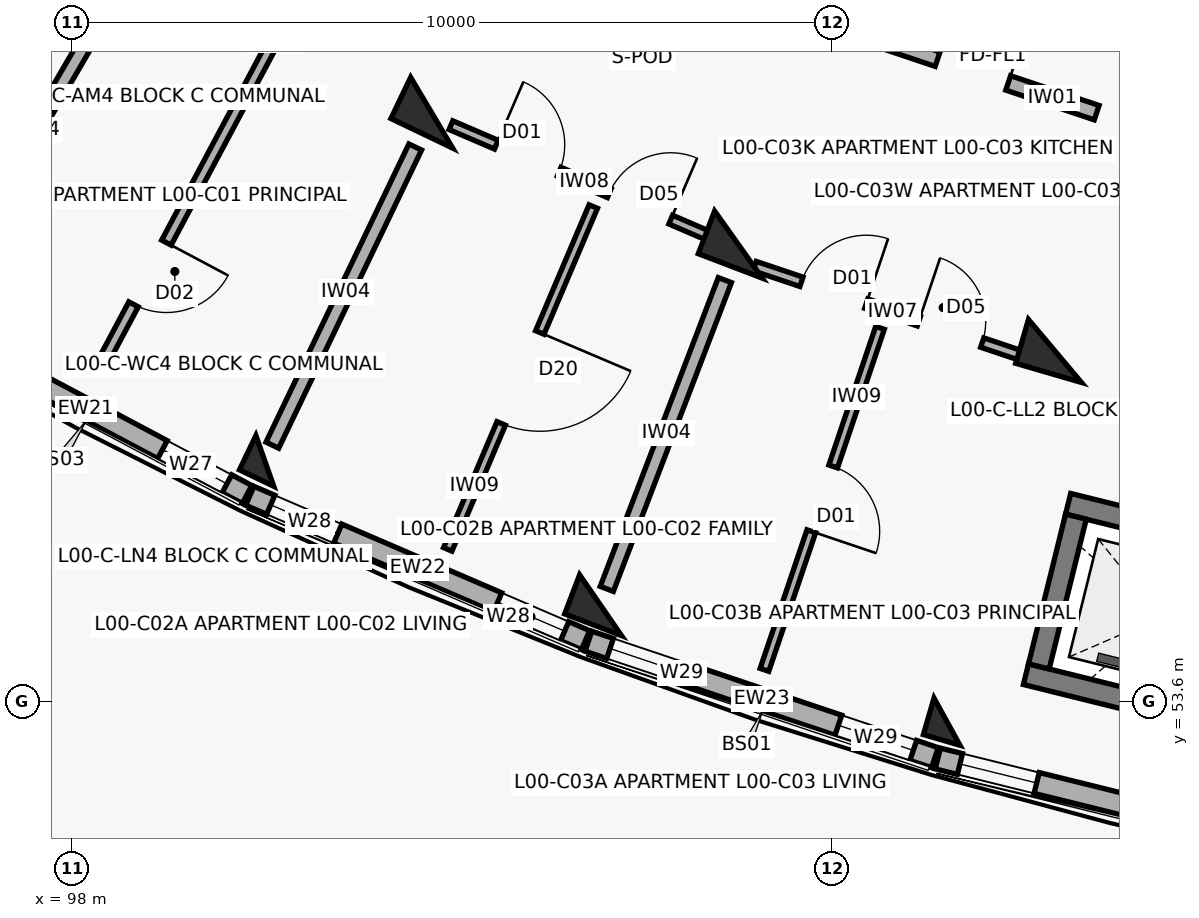
"""IFC4 building model, lengths in metres.
Left out: names, types, materials, properties, quantities, classifications, styles, units other than length and angle.
Written with IfcOpenShell. Run it as: python <this file> out.ifc"""

import sys

from ifc_helpers import new_model, si_unit, direction, frame, frame_2d, origin, origin_2d, place, context, subcontext, project, spatial, rectangle, extrude, element, fill, save


model = new_model("IFC4")
c1 = context("Model", 3, precision=1e-05, world=origin(), true_north=direction((0.0, 1.0)))
c2 = subcontext(c1, "Body", "Model", "MODEL_VIEW")
j1 = project(units=[si_unit("LENGTHUNIT", "METRE"), si_unit("PLANEANGLEUNIT", "RADIAN")], contexts=[c1])
p1 = place(None, origin())
s1 = spatial("IfcSite", under=j1, at=p1, CompositionType="ELEMENT")
p2 = place(p1, origin())
s2 = spatial("IfcBuilding", under=s1, at=p2, CompositionType="ELEMENT")
p3 = place(p2, origin())
s3 = spatial("IfcBuildingStorey", under=s2, at=p3, CompositionType="ELEMENT", Elevation=0.0)
p4 = place(p3, frame((102.734, 61.341, 0.0), z_axis=(0.0, 0.0, 1.0), x_axis=(-0.432085748802, -0.901832526405, 0.0)))
e1 = element("IfcColumn", 1, at=p4, inside=s3, PredefinedType="COLUMN", context=c2, shape_type="SweptSolid", body=[
    extrude(rectangle(XDim=0.6, YDim=0.9, at=origin_2d()), origin(), (0.0, 0.0, 1.0), 4.5),
])
p5 = place(p3, frame((100.539, 56.76, 0.0), z_axis=(0.0, 0.0, 1.0), x_axis=(-0.432085748802, -0.901832526405, 0.0)))
e2 = element("IfcColumn", 2, at=p5, inside=s3, PredefinedType="COLUMN", context=c2, shape_type="SweptSolid", body=[
    extrude(rectangle(XDim=0.5, YDim=0.5, at=origin_2d()), origin(), (0.0, 0.0, 1.0), 4.5),
])
p6 = place(p3, frame((106.77, 59.606, 0.0), z_axis=(0.0, 0.0, 1.0), x_axis=(-0.357064076459, -0.934079892355, 0.0)))
e3 = element("IfcColumn", 3, at=p6, inside=s3, PredefinedType="COLUMN", context=c2, shape_type="SweptSolid", body=[
    extrude(rectangle(XDim=0.6, YDim=0.9, at=origin_2d()), origin(), (0.0, 0.0, 1.0), 4.5),
])
p7 = place(p3, frame((104.956, 54.861, 0.0), z_axis=(0.0, 0.0, 1.0), x_axis=(-0.357064076459, -0.934079892355, 0.0)))
e4 = element("IfcColumn", 4, at=p7, inside=s3, PredefinedType="COLUMN", context=c2, shape_type="SweptSolid", body=[
    extrude(rectangle(XDim=0.55, YDim=0.8, at=origin_2d()), origin(), (0.0, 0.0, 1.0), 4.5),
])
p8 = place(p3, frame((110.934, 58.207, 0.0), z_axis=(0.0, 0.0, 1.0), x_axis=(-0.27966144946, -0.96009867914, 0.0)))
e5 = element("IfcColumn", 5, at=p8, inside=s3, PredefinedType="COLUMN", context=c2, shape_type="SweptSolid", body=[
    extrude(rectangle(XDim=0.6, YDim=0.9, at=origin_2d()), origin(), (0.0, 0.0, 1.0), 4.5),
])
p9 = place(p3, frame((109.513, 53.329, 0.0), z_axis=(0.0, 0.0, 1.0), x_axis=(-0.27966144946, -0.96009867914, 0.0)))
e6 = element("IfcColumn", 6, at=p9, inside=s3, PredefinedType="COLUMN", context=c2, shape_type="SweptSolid", body=[
    extrude(rectangle(XDim=0.5, YDim=0.5, at=origin_2d()), origin(), (0.0, 0.0, 1.0), 4.5),
])
p10 = place(p3, frame((96.057, 58.572, 0.0), z_axis=(0.0, 0.0, 1.0), x_axis=(0.883448093208, -0.468529045639, 0.0)))
e7 = element("IfcWall", 7, at=p10, inside=s3, PredefinedType="SOLIDWALL", context=c2, shape_type="SweptSolid", body=[
    extrude(rectangle(XDim=4.809, YDim=0.268, at=frame_2d((2.405, 0.0))), origin(), (0.0, 0.0, 1.0), 3.45),
])
p11 = place(p10, frame((0.3, 0.0, 0.3)))
e8 = element("IfcOpeningElement", 8, at=p11, cuts=e7, PredefinedType="OPENING", context=c2, shape_type="SweptSolid", body=[
    extrude(rectangle(XDim=0.96, YDim=1.42, at=frame_2d((0.48, 0.71))), frame((0.0, 0.144, 0.0), z_axis=(0.0, -1.0, 0.0), x_axis=(1.0, 0.0, 0.0)), (0.0, 0.0, 1.0), 0.288),
])
p12 = place(p10, frame((3.549, 0.0, 0.3)))
e9 = element("IfcOpeningElement", 9, at=p12, cuts=e7, PredefinedType="OPENING", context=c2, shape_type="SweptSolid", body=[
    extrude(rectangle(XDim=0.96, YDim=1.42, at=frame_2d((0.48, 0.71))), frame((0.0, 0.144, 0.0), z_axis=(0.0, -1.0, 0.0), x_axis=(1.0, 0.0, 0.0)), (0.0, 0.0, 1.0), 0.288),
])
p13 = place(p3, frame((100.341, 56.301, 0.0), z_axis=(0.0, 0.0, 1.0), x_axis=(0.918737524932, -0.39486878869, 0.0)))
e10 = element("IfcWall", 10, at=p13, inside=s3, PredefinedType="SOLIDWALL", context=c2, shape_type="SweptSolid", body=[
    extrude(rectangle(XDim=4.809, YDim=0.272, at=frame_2d((2.405, 0.0))), origin(), (0.0, 0.0, 1.0), 3.45),
])
p14 = place(p13, frame((0.3, 0.0, 0.3)))
e11 = element("IfcOpeningElement", 11, at=p14, cuts=e10, PredefinedType="OPENING", context=c2, shape_type="SweptSolid", body=[
    extrude(rectangle(XDim=0.96, YDim=1.56, at=frame_2d((0.48, 0.78))), frame((0.0, 0.146, 0.0), z_axis=(0.0, -1.0, 0.0), x_axis=(1.0, 0.0, 0.0)), (0.0, 0.0, 1.0), 0.292),
])
p15 = place(p13, frame((3.549, 0.0, 0.3)))
e12 = element("IfcOpeningElement", 12, at=p15, cuts=e10, PredefinedType="OPENING", context=c2, shape_type="SweptSolid", body=[
    extrude(rectangle(XDim=0.96, YDim=1.56, at=frame_2d((0.48, 0.78))), frame((0.0, 0.146, 0.0), z_axis=(0.0, -1.0, 0.0), x_axis=(1.0, 0.0, 0.0)), (0.0, 0.0, 1.0), 0.292),
])
p16 = place(p3, frame((104.796, 54.388, 0.0), z_axis=(0.0, 0.0, 1.0), x_axis=(0.947883232114, -0.318617918952, 0.0)))
e13 = element("IfcWall", 13, at=p16, inside=s3, PredefinedType="SOLIDWALL", context=c2, shape_type="SweptSolid", body=[
    extrude(rectangle(XDim=4.809, YDim=0.278, at=frame_2d((2.405, 0.0))), origin(), (0.0, 0.0, 1.0), 3.45),
])
p17 = place(p16, frame((0.3, 0.0, 0.3)))
e14 = element("IfcOpeningElement", 14, at=p17, cuts=e13, PredefinedType="OPENING", context=c2, shape_type="SweptSolid", body=[
    extrude(rectangle(XDim=1.04, YDim=1.16, at=frame_2d((0.52, 0.58))), frame((0.0, 0.149, 0.0), z_axis=(0.0, -1.0, 0.0), x_axis=(1.0, 0.0, 0.0)), (0.0, 0.0, 1.0), 0.298),
])
p18 = place(p16, frame((3.469, 0.0, 0.3)))
e15 = element("IfcOpeningElement", 15, at=p18, cuts=e13, PredefinedType="OPENING", context=c2, shape_type="SweptSolid", body=[
    extrude(rectangle(XDim=1.04, YDim=1.16, at=frame_2d((0.52, 0.58))), frame((0.0, 0.149, 0.0), z_axis=(0.0, -1.0, 0.0), x_axis=(1.0, 0.0, 0.0)), (0.0, 0.0, 1.0), 0.298),
])
p19 = place(p3, frame((109.393, 52.844, 0.0), z_axis=(0.0, 0.0, 1.0), x_axis=(0.970716115822, -0.240229520426, 0.0)))
e16 = element("IfcWall", 16, at=p19, inside=s3, PredefinedType="SOLIDWALL", context=c2, shape_type="SweptSolid", body=[
    extrude(rectangle(XDim=4.809, YDim=0.282, at=frame_2d((2.405, 0.0))), origin(), (0.0, 0.0, 1.0), 3.45),
])
p20 = place(p19, frame((0.3, 0.0, 0.3)))
e17 = element("IfcOpeningElement", 17, at=p20, cuts=e16, PredefinedType="OPENING", context=c2, shape_type="SweptSolid", body=[
    extrude(rectangle(XDim=1.04, YDim=1.28, at=frame_2d((0.52, 0.64))), frame((0.0, 0.151, 0.0), z_axis=(0.0, -1.0, 0.0), x_axis=(1.0, 0.0, 0.0)), (0.0, 0.0, 1.0), 0.302),
])
p21 = place(p19, frame((3.469, 0.0, 0.3)))
e18 = element("IfcOpeningElement", 18, at=p21, cuts=e16, PredefinedType="OPENING", context=c2, shape_type="SweptSolid", body=[
    extrude(rectangle(XDim=1.04, YDim=1.28, at=frame_2d((0.52, 0.64))), frame((0.0, 0.151, 0.0), z_axis=(0.0, -1.0, 0.0), x_axis=(1.0, 0.0, 0.0)), (0.0, 0.0, 1.0), 0.302),
])
p22 = place(p3, frame((111.108, 56.196, 0.0), z_axis=(0.0, 0.0, 1.0), x_axis=(0.970706856107, -0.240266933861, 0.0)))
e19 = element("IfcWall", 19, at=p22, inside=s3, PredefinedType="SHEAR", context=c2, shape_type="SweptSolid", body=[
    extrude(rectangle(XDim=3.09, YDim=0.28, at=frame_2d((1.545, 0.0))), origin(), (0.0, 0.0, 1.0), 4.5),
])
p23 = place(p22, frame((0.995, 0.0, 0.0)))
e20 = element("IfcOpeningElement", 20, at=p23, cuts=e19, PredefinedType="OPENING", context=c2, shape_type="SweptSolid", body=[
    extrude(rectangle(XDim=1.1, YDim=2.15, at=frame_2d((0.55, 1.075))), frame((0.0, 0.15, 0.0), z_axis=(0.0, -1.0, 0.0), x_axis=(1.0, 0.0, 0.0)), (0.0, 0.0, 1.0), 0.3),
])
p24 = place(p3, frame((110.553, 53.954, 0.0), z_axis=(0.0, 0.0, 1.0), x_axis=(0.970725280816, -0.240192483614, 0.0)))
e21 = element("IfcWall", 21, at=p24, inside=s3, PredefinedType="SHEAR", context=c2, shape_type="SweptSolid", body=[
    extrude(rectangle(XDim=3.09, YDim=0.28, at=frame_2d((1.545, 0.0))), origin(), (0.0, 0.0, 1.0), 4.5),
])
p25 = place(p3, frame((111.21, 56.027, 0.0), z_axis=(0.0, 0.0, 1.0), x_axis=(-0.240186044774, -0.970726873995, 0.0)))
e22 = element("IfcWall", 22, at=p25, inside=s3, PredefinedType="SHEAR", context=c2, shape_type="SweptSolid", body=[
    extrude(rectangle(XDim=2.03, YDim=0.28, at=frame_2d((1.015, 0.0))), origin(), (0.0, 0.0, 1.0), 4.5),
])
p26 = place(p3, frame((102.087, 64.973, 0.0), z_axis=(0.0, 0.0, 1.0), x_axis=(-0.469878800394, -0.882730940287, 0.0)))
e23 = element("IfcWall", 23, at=p26, inside=s3, PredefinedType="PARTITIONING", context=c2, shape_type="SweptSolid", body=[
    extrude(rectangle(XDim=7.95, YDim=0.14, at=frame_2d((3.975, 0.0))), origin(), (0.0, 0.0, 1.0), 3.34),
])
p27 = place(p26, frame((6.05, 0.0, 0.0)))
e24 = element("IfcOpeningElement", 24, at=p27, cuts=e23, PredefinedType="OPENING", context=c2, shape_type="SweptSolid", body=[
    extrude(rectangle(XDim=0.92, YDim=2.1, at=frame_2d((0.46, 1.05))), frame((0.0, 0.08, 0.0), z_axis=(0.0, -1.0, 0.0), x_axis=(1.0, 0.0, 0.0)), (0.0, 0.0, 1.0), 0.16),
])
p28 = place(p3, frame((98.601, 62.968, 0.0), z_axis=(0.0, 0.0, 1.0), x_axis=(-0.504216452091, -0.863577309475, 0.0)))
e25 = element("IfcWall", 25, at=p28, inside=s3, PredefinedType="SOLIDWALL", context=c2, shape_type="SweptSolid", body=[
    extrude(rectangle(XDim=4.35, YDim=0.185, at=frame_2d((2.175, 0.0))), origin(), (0.0, 0.0, 1.0), 3.34),
])
p29 = place(p3, frame((102.988, 61.178, 0.0), z_axis=(0.0, 0.0, 1.0), x_axis=(0.918732171064, -0.394881245253, 0.0)))
e26 = element("IfcWall", 26, at=p29, inside=s3, PredefinedType="PARTITIONING", context=c2, shape_type="SweptSolid", body=[
    extrude(rectangle(XDim=3.797, YDim=0.125, at=frame_2d((1.899, 0.0))), origin(), (0.0, 0.0, 1.0), 3.34),
])
p30 = place(p29, frame((0.65, 0.0, 0.0)))
e27 = element("IfcOpeningElement", 27, at=p30, cuts=e26, PredefinedType="OPENING", context=c2, shape_type="SweptSolid", body=[
    extrude(rectangle(XDim=0.9, YDim=2.1, at=frame_2d((0.45, 1.05))), frame((0.0, 0.073, 0.0), z_axis=(0.0, -1.0, 0.0), x_axis=(1.0, 0.0, 0.0)), (0.0, 0.0, 1.0), 0.145),
])
p31 = place(p29, frame((2.267, 0.0, 0.0)))
e28 = element("IfcOpeningElement", 28, at=p31, cuts=e26, PredefinedType="OPENING", context=c2, shape_type="SweptSolid", body=[
    extrude(rectangle(XDim=0.88, YDim=2.1, at=frame_2d((0.44, 1.05))), frame((0.0, 0.073, 0.0), z_axis=(0.0, -1.0, 0.0), x_axis=(1.0, 0.0, 0.0)), (0.0, 0.0, 1.0), 0.145),
])
p32 = place(p3, frame((104.86, 60.107, 0.0), z_axis=(0.0, 0.0, 1.0), x_axis=(-0.390783996242, -0.920482410631, 0.0)))
e29 = element("IfcWall", 29, at=p32, inside=s3, PredefinedType="PARTITIONING", context=c2, shape_type="SweptSolid", body=[
    extrude(rectangle(XDim=4.9, YDim=0.12, at=frame_2d((2.45, 0.0))), origin(), (0.0, 0.0, 1.0), 3.34),
])
p33 = place(p32, frame((1.8, 0.0, 0.0)))
e30 = element("IfcOpeningElement", 30, at=p33, cuts=e29, PredefinedType="OPENING", context=c2, shape_type="SweptSolid", body=[
    extrude(rectangle(XDim=1.3, YDim=2.1, at=frame_2d((0.65, 1.05))), frame((0.0, 0.07, 0.0), z_axis=(0.0, -1.0, 0.0), x_axis=(1.0, 0.0, 0.0)), (0.0, 0.0, 1.0), 0.14),
])
p34 = place(p3, frame((102.518, 60.89, 0.0), z_axis=(0.0, 0.0, 1.0), x_axis=(-0.432108769108, -0.901821496561, 0.0)))
e31 = element("IfcWall", 31, at=p34, inside=s3, PredefinedType="SOLIDWALL", context=c2, shape_type="SweptSolid", body=[
    extrude(rectangle(XDim=4.35, YDim=0.185, at=frame_2d((2.175, 0.0))), origin(), (0.0, 0.0, 1.0), 3.34),
])
p35 = place(p3, frame((108.227, 62.437, 0.0), z_axis=(0.0, 0.0, 1.0), x_axis=(0.947884468821, -0.318614239745, 0.0)))
e32 = element("IfcWall", 32, at=p35, inside=s3, PredefinedType="SOLIDWALL", context=c2, shape_type="SweptSolid", body=[
    extrude(rectangle(XDim=3.436, YDim=0.2, at=frame_2d((1.718, 0.0))), origin(), (0.0, 0.0, 1.0), 3.34),
])
p36 = place(p35, frame((1.228, 0.0, 0.0)))
e33 = element("IfcOpeningElement", 33, at=p36, cuts=e32, PredefinedType="OPENING", context=c2, shape_type="SweptSolid", body=[
    extrude(rectangle(XDim=0.98, YDim=2.15, at=frame_2d((0.49, 1.075))), frame((0.0, 0.11, 0.0), z_axis=(0.0, -1.0, 0.0), x_axis=(1.0, 0.0, 0.0)), (0.0, 0.0, 1.0), 0.22),
])
p37 = place(p3, frame((106.983, 59.324, 0.0), z_axis=(0.0, 0.0, 1.0), x_axis=(0.947879193428, -0.318629933725, 0.0)))
e34 = element("IfcWall", 34, at=p37, inside=s3, PredefinedType="PARTITIONING", context=c2, shape_type="SweptSolid", body=[
    extrude(rectangle(XDim=3.81, YDim=0.13, at=frame_2d((1.905, 0.0))), origin(), (0.0, 0.0, 1.0), 3.34),
])
p38 = place(p37, frame((0.65, 0.0, 0.0)))
e35 = element("IfcOpeningElement", 35, at=p38, cuts=e34, PredefinedType="OPENING", context=c2, shape_type="SweptSolid", body=[
    extrude(rectangle(XDim=0.9, YDim=2.1, at=frame_2d((0.45, 1.05))), frame((0.0, 0.075, 0.0), z_axis=(0.0, -1.0, 0.0), x_axis=(1.0, 0.0, 0.0)), (0.0, 0.0, 1.0), 0.15),
])
p39 = place(p37, frame((2.28, 0.0, 0.0)))
e36 = element("IfcOpeningElement", 36, at=p39, cuts=e34, PredefinedType="OPENING", context=c2, shape_type="SweptSolid", body=[
    extrude(rectangle(XDim=0.88, YDim=2.1, at=frame_2d((0.44, 1.05))), frame((0.0, 0.075, 0.0), z_axis=(0.0, -1.0, 0.0), x_axis=(1.0, 0.0, 0.0)), (0.0, 0.0, 1.0), 0.15),
])
p40 = place(p3, frame((108.633, 58.511, 0.0), z_axis=(0.0, 0.0, 1.0), x_axis=(-0.320064719126, -0.947395680574, 0.0)))
e37 = element("IfcWall", 37, at=p40, inside=s3, PredefinedType="PARTITIONING", context=c2, shape_type="SweptSolid", body=[
    extrude(rectangle(XDim=4.75, YDim=0.12, at=frame_2d((2.375, 0.0))), origin(), (0.0, 0.0, 1.0), 3.34),
])
p41 = place(p40, frame((1.925, 0.0, 0.0)))
e38 = element("IfcOpeningElement", 38, at=p41, cuts=e37, PredefinedType="OPENING", context=c2, shape_type="SweptSolid", body=[
    extrude(rectangle(XDim=0.9, YDim=2.1, at=frame_2d((0.45, 1.05))), frame((0.0, 0.07, 0.0), z_axis=(0.0, -1.0, 0.0), x_axis=(1.0, 0.0, 0.0)), (0.0, 0.0, 1.0), 0.14),
])
p42 = place(p3, frame((106.591, 59.139, 0.0), z_axis=(0.0, 0.0, 1.0), x_axis=(-0.357064016205, -0.934079915388, 0.0)))
e39 = element("IfcWall", 39, at=p42, inside=s3, PredefinedType="SOLIDWALL", context=c2, shape_type="SweptSolid", body=[
    extrude(rectangle(XDim=4.35, YDim=0.185, at=frame_2d((2.175, 0.0))), origin(), (0.0, 0.0, 1.0), 3.34),
])
p43 = place(p12, origin())
e40 = element("IfcWindow", 40, at=p43, inside=s3, PartitioningType="DOUBLE_PANEL_VERTICAL", PredefinedType="WINDOW", context=c2, shape_type="SweptSolid", body=[
    extrude(rectangle(XDim=0.96, YDim=1.42, at=frame_2d((0.48, 0.71))), frame((0.0, 0.03, 0.0), z_axis=(0.0, -1.0, 0.0), x_axis=(1.0, 0.0, 0.0)), (0.0, 0.0, 1.0), 0.06),
])
fill(e9, e40)
p44 = place(p14, origin())
e41 = element("IfcWindow", 41, at=p44, inside=s3, PartitioningType="DOUBLE_PANEL_VERTICAL", PredefinedType="WINDOW", context=c2, shape_type="SweptSolid", body=[
    extrude(rectangle(XDim=0.96, YDim=1.56, at=frame_2d((0.48, 0.78))), frame((0.0, 0.03, 0.0), z_axis=(0.0, -1.0, 0.0), x_axis=(1.0, 0.0, 0.0)), (0.0, 0.0, 1.0), 0.06),
])
fill(e11, e41)
p45 = place(p15, origin())
e42 = element("IfcWindow", 42, at=p45, inside=s3, PartitioningType="DOUBLE_PANEL_VERTICAL", PredefinedType="WINDOW", context=c2, shape_type="SweptSolid", body=[
    extrude(rectangle(XDim=0.96, YDim=1.56, at=frame_2d((0.48, 0.78))), frame((0.0, 0.03, 0.0), z_axis=(0.0, -1.0, 0.0), x_axis=(1.0, 0.0, 0.0)), (0.0, 0.0, 1.0), 0.06),
])
fill(e12, e42)
p46 = place(p17, origin())
e43 = element("IfcWindow", 43, at=p46, inside=s3, PartitioningType="DOUBLE_PANEL_VERTICAL", PredefinedType="WINDOW", context=c2, shape_type="SweptSolid", body=[
    extrude(rectangle(XDim=1.04, YDim=1.16, at=frame_2d((0.52, 0.58))), frame((0.0, 0.03, 0.0), z_axis=(0.0, -1.0, 0.0), x_axis=(1.0, 0.0, 0.0)), (0.0, 0.0, 1.0), 0.06),
])
fill(e14, e43)
p47 = place(p18, origin())
e44 = element("IfcWindow", 44, at=p47, inside=s3, PartitioningType="DOUBLE_PANEL_VERTICAL", PredefinedType="WINDOW", context=c2, shape_type="SweptSolid", body=[
    extrude(rectangle(XDim=1.04, YDim=1.16, at=frame_2d((0.52, 0.58))), frame((0.0, 0.03, 0.0), z_axis=(0.0, -1.0, 0.0), x_axis=(1.0, 0.0, 0.0)), (0.0, 0.0, 1.0), 0.06),
])
fill(e15, e44)
p48 = place(p20, origin())
e45 = element("IfcWindow", 45, at=p48, inside=s3, PartitioningType="DOUBLE_PANEL_VERTICAL", PredefinedType="WINDOW", context=c2, shape_type="SweptSolid", body=[
    extrude(rectangle(XDim=1.04, YDim=1.28, at=frame_2d((0.52, 0.64))), frame((0.0, 0.03, 0.0), z_axis=(0.0, -1.0, 0.0), x_axis=(1.0, 0.0, 0.0)), (0.0, 0.0, 1.0), 0.06),
])
fill(e17, e45)
p49 = place(p27, origin())
e46 = element("IfcDoor", 46, at=p49, inside=s3, OperationType="SINGLE_SWING_LEFT", PredefinedType="DOOR", context=c2, shape_type="SweptSolid", body=[
    extrude(rectangle(XDim=0.92, YDim=2.1, at=frame_2d((0.46, 1.05))), frame((0.0, 0.025, 0.0), z_axis=(0.0, -1.0, 0.0), x_axis=(1.0, 0.0, 0.0)), (0.0, 0.0, 1.0), 0.05),
])
fill(e24, e46)
p50 = place(p30, origin())
e47 = element("IfcDoor", 47, at=p50, inside=s3, OperationType="SINGLE_SWING_LEFT", PredefinedType="DOOR", context=c2, shape_type="SweptSolid", body=[
    extrude(rectangle(XDim=0.9, YDim=2.1, at=frame_2d((0.45, 1.05))), frame((0.0, 0.025, 0.0), z_axis=(0.0, -1.0, 0.0), x_axis=(1.0, 0.0, 0.0)), (0.0, 0.0, 1.0), 0.05),
])
fill(e27, e47)
p51 = place(p31, origin())
e48 = element("IfcDoor", 48, at=p51, inside=s3, OperationType="SINGLE_SWING_RIGHT", PredefinedType="DOOR", context=c2, shape_type="SweptSolid", body=[
    extrude(rectangle(XDim=0.88, YDim=2.1, at=frame_2d((0.44, 1.05))), frame((0.0, 0.025, 0.0), z_axis=(0.0, -1.0, 0.0), x_axis=(1.0, 0.0, 0.0)), (0.0, 0.0, 1.0), 0.05),
])
fill(e28, e48)
p52 = place(p33, origin())
e49 = element("IfcDoor", 49, at=p52, inside=s3, OperationType="SINGLE_SWING_LEFT", PredefinedType="DOOR", context=c2, shape_type="SweptSolid", body=[
    extrude(rectangle(XDim=1.3, YDim=2.1, at=frame_2d((0.65, 1.05))), frame((0.0, 0.025, 0.0), z_axis=(0.0, -1.0, 0.0), x_axis=(1.0, 0.0, 0.0)), (0.0, 0.0, 1.0), 0.05),
])
fill(e30, e49)
p53 = place(p36, origin())
e50 = element("IfcDoor", 50, at=p53, inside=s3, OperationType="SINGLE_SWING_RIGHT", PredefinedType="DOOR", context=c2, shape_type="SweptSolid", body=[
    extrude(rectangle(XDim=0.98, YDim=2.15, at=frame_2d((0.49, 1.075))), frame((0.0, 0.025, 0.0), z_axis=(0.0, -1.0, 0.0), x_axis=(1.0, 0.0, 0.0)), (0.0, 0.0, 1.0), 0.05),
])
fill(e33, e50)
p54 = place(p38, origin())
e51 = element("IfcDoor", 51, at=p54, inside=s3, OperationType="SINGLE_SWING_RIGHT", PredefinedType="DOOR", context=c2, shape_type="SweptSolid", body=[
    extrude(rectangle(XDim=0.9, YDim=2.1, at=frame_2d((0.45, 1.05))), frame((0.0, 0.025, 0.0), z_axis=(0.0, -1.0, 0.0), x_axis=(1.0, 0.0, 0.0)), (0.0, 0.0, 1.0), 0.05),
])
fill(e35, e51)
p55 = place(p39, origin())
e52 = element("IfcDoor", 52, at=p55, inside=s3, OperationType="SINGLE_SWING_LEFT", PredefinedType="DOOR", context=c2, shape_type="SweptSolid", body=[
    extrude(rectangle(XDim=0.88, YDim=2.1, at=frame_2d((0.44, 1.05))), frame((0.0, 0.025, 0.0), z_axis=(0.0, -1.0, 0.0), x_axis=(1.0, 0.0, 0.0)), (0.0, 0.0, 1.0), 0.05),
])
fill(e36, e52)
p56 = place(p41, origin())
e53 = element("IfcDoor", 53, at=p56, inside=s3, OperationType="SINGLE_SWING_RIGHT", PredefinedType="DOOR", context=c2, shape_type="SweptSolid", body=[
    extrude(rectangle(XDim=0.9, YDim=2.1, at=frame_2d((0.45, 1.05))), frame((0.0, 0.025, 0.0), z_axis=(0.0, -1.0, 0.0), x_axis=(1.0, 0.0, 0.0)), (0.0, 0.0, 1.0), 0.05),
])
fill(e38, e53)
save(model, sys.argv[1])
